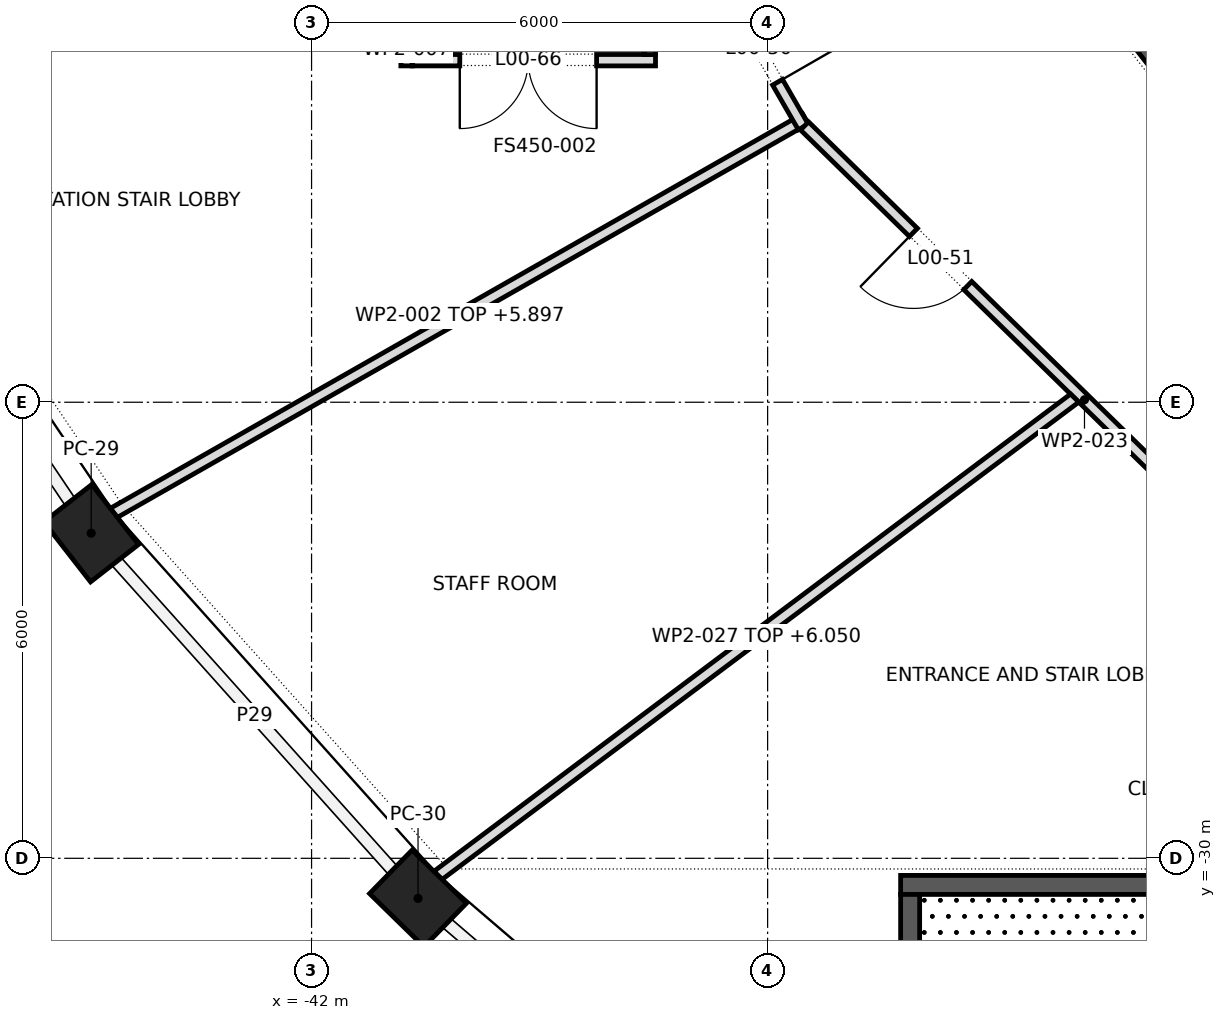
"""IFC4 building model, lengths in metres.
Left out: names, types, materials, properties, quantities, classifications, styles, units other than length and angle.
Written with IfcOpenShell. Run it as: python <this file> out.ifc"""

import sys

from ifc_helpers import new_model, si_unit, direction, frame, frame_2d, origin, origin_2d, place, context, subcontext, project, spatial, polyline, rectangle, outline, extrude, element, fill, save


model = new_model("IFC4")
c1 = context("Model", 3, precision=1e-05, world=origin(), true_north=direction((0.0, 1.0)))
c2 = subcontext(c1, "Body", "Model", "MODEL_VIEW")
j1 = project(units=[si_unit("LENGTHUNIT", "METRE"), si_unit("PLANEANGLEUNIT", "RADIAN")], contexts=[c1])
p1 = place(None, origin())
s1 = spatial("IfcSite", under=j1, at=p1, CompositionType="ELEMENT")
p2 = place(p1, origin())
s2 = spatial("IfcBuilding", under=s1, at=p2, CompositionType="ELEMENT")
p3 = place(p2, origin())
s3 = spatial("IfcBuildingStorey", under=s2, at=p3, CompositionType="ELEMENT", Elevation=0.0)
for number, where, z_axis, x_axis in (
    (1, (-44.899, -25.723, 0.0), (0.0, 0.0, 1.0), (0.615, -0.789, 0.0)),
    (2, (-40.599, -30.528, 0.0), (0.0, 0.0, 1.0), (0.715, -0.699, 0.0)),
):
    element("IfcColumn", number, at=place(p3, frame(where, z_axis=z_axis, x_axis=x_axis)), inside=s3, PredefinedType="COLUMN", context=c2, shape_type="SweptSolid", body=[
        extrude(rectangle(XDim=1.0, YDim=0.8, at=origin_2d()), origin(), (0.0, 0.0, 1.0), 7.0),
    ])
p4 = place(p3, frame((-34.097, -14.605, 0.0), z_axis=(0.0, 0.0, 1.0), x_axis=(0.614825322247, -0.788663314174, 0.0)))
e3 = element("IfcWall", 3, at=p4, inside=s3, PredefinedType="SHEAR", context=c2, shape_type="SweptSolid", body=[
    extrude(rectangle(XDim=8.632, YDim=1.2, at=frame_2d((4.316, 0.0))), origin(), (0.0, 0.0, 1.0), 7.0),
])
p5 = place(p3, frame((-34.25, -30.35, 0.0), z_axis=(0.0, 0.0, 1.0), x_axis=(1.0, 0.0, 0.0)))
e4 = element("IfcWall", 4, at=p5, inside=s3, PredefinedType="SHEAR", context=c2, shape_type="SweptSolid", body=[
    extrude(rectangle(XDim=8.5, YDim=0.25, at=frame_2d((4.25, 0.0))), origin(), (0.0, 0.0, 1.0), 6.65),
])
p6 = place(p3, frame((-34.125, -33.525, 0.0), z_axis=(0.0, 0.0, 1.0), x_axis=(0.0, 1.0, 0.0)))
e5 = element("IfcWall", 5, at=p6, inside=s3, PredefinedType="SHEAR", context=c2, shape_type="SweptSolid", body=[
    extrude(rectangle(XDim=3.05, YDim=0.25, at=frame_2d((1.525, 0.0))), origin(), (0.0, 0.0, 1.0), 6.65),
])
p7 = place(p3, frame((-44.602, -25.456, 0.0), z_axis=(0.0, 0.0, 1.0), x_axis=(0.868872232998, 0.495036405455, 0.0)))
e6 = element("IfcWall", 6, at=p7, inside=s3, PredefinedType="PARTITIONING", context=c2, shape_type="SweptSolid", body=[
    extrude(outline(polyline([(0.011, -0.075), (10.473, -0.075), (10.473, 0.075), (-0.011, 0.075), (0.011, -0.075)])), origin(), (0.0, 0.0, 1.0), 5.897),
])
p8 = place(p3, frame((-40.75, -19.575, 0.0), z_axis=(0.0, 0.0, 1.0), x_axis=(0.0, 1.0, 0.0)))
e7 = element("IfcWall", 7, at=p8, inside=s3, PredefinedType="PARTITIONING", context=c2, shape_type="SweptSolid", body=[
    extrude(rectangle(XDim=0.425, YDim=0.15, at=frame_2d((0.212, 0.0))), origin(), (0.0, 0.0, 1.0), 6.65),
])
p9 = place(p3, frame((-37.475, -19.5, 0.0), z_axis=(0.0, 0.0, 1.0), x_axis=(-1.0, 0.0, 0.0)))
e8 = element("IfcWall", 8, at=p9, inside=s3, PredefinedType="PARTITIONING", context=c2, shape_type="SweptSolid", body=[
    extrude(rectangle(XDim=3.2, YDim=0.15, at=frame_2d((1.6, 0.0))), origin(), (0.0, 0.0, 1.0), 6.65),
])
p10 = place(p9, frame((0.775, 0.0, 0.0)))
e9 = element("IfcOpeningElement", 9, at=p10, cuts=e8, PredefinedType="OPENING", context=c2, shape_type="SweptSolid", body=[
    extrude(rectangle(XDim=1.8, YDim=2.1, at=frame_2d((0.9, 1.05))), frame((0.0, 0.087, 0.0), z_axis=(0.0, -1.0, 0.0), x_axis=(1.0, 0.0, 0.0)), (0.0, 0.0, 1.0), 0.174),
])
p11 = place(p3, frame((-37.55, -19.426, 0.0), z_axis=(0.0, 0.0, 1.0), x_axis=(0.0, 1.0, 0.0)))
e10 = element("IfcWall", 10, at=p11, inside=s3, PredefinedType="PARTITIONING", context=c2, shape_type="SweptSolid", body=[
    extrude(rectangle(XDim=4.351, YDim=0.15, at=frame_2d((2.176, 0.0))), origin(), (0.0, 0.0, 1.0), 6.65),
])
p12 = place(p3, frame((-35.531, -20.378, 0.0), z_axis=(0.0, 0.0, 1.0), x_axis=(-0.498840465352, 0.866693827212, 0.0)))
e11 = element("IfcWall", 11, at=p12, inside=s3, PredefinedType="PARTITIONING", context=c2, shape_type="SweptSolid", body=[
    extrude(rectangle(XDim=3.899, YDim=0.15, at=frame_2d((1.95, 0.0))), origin(), (0.0, 0.0, 1.0), 6.65),
])
p13 = place(p12, frame((0.679, 0.0, 0.0)))
e12 = element("IfcOpeningElement", 12, at=p13, cuts=e11, PredefinedType="OPENING", context=c2, shape_type="SweptSolid", body=[
    extrude(rectangle(XDim=1.0, YDim=2.1, at=frame_2d((0.5, 1.05))), frame((0.0, 0.087, 0.0), z_axis=(0.0, -1.0, 0.0), x_axis=(1.0, 0.0, 0.0)), (0.0, 0.0, 1.0), 0.174),
])
p14 = place(p3, frame((-35.514, -20.365, 0.0), z_axis=(0.0, 0.0, 1.0), x_axis=(0.714835312925, -0.699292839514, 0.0)))
e13 = element("IfcWall", 13, at=p14, inside=s3, PredefinedType="PARTITIONING", context=c2, shape_type="SweptSolid", body=[
    extrude(rectangle(XDim=10.304, YDim=0.15, at=frame_2d((5.152, 0.0))), origin(), (0.0, 0.0, 1.0), 6.65),
])
p15 = place(p14, frame((2.004, 0.0, 0.0)))
e14 = element("IfcOpeningElement", 14, at=p15, cuts=e13, PredefinedType="OPENING", context=c2, shape_type="SweptSolid", body=[
    extrude(rectangle(XDim=1.0, YDim=2.1, at=frame_2d((0.5, 1.05))), frame((0.0, 0.087, 0.0), z_axis=(0.0, -1.0, 0.0), x_axis=(1.0, 0.0, 0.0)), (0.0, 0.0, 1.0), 0.174),
])
p16 = place(p3, frame((-31.96, -23.945, 0.0), z_axis=(0.0, 0.0, 1.0), x_axis=(-0.800117504973, -0.599843294732, 0.0)))
e15 = element("IfcWall", 15, at=p16, inside=s3, PredefinedType="PARTITIONING", context=c2, shape_type="SweptSolid", body=[
    extrude(outline(polyline([(0.011, -0.075), (10.482, -0.075), (10.459, 0.075), (-0.011, 0.075), (0.011, -0.075)])), origin(), (0.0, 0.0, 1.0), 6.05),
])
p17 = place(p13, frame((1.0, 0.0, 0.0), z_axis=(0.0, 0.0, 1.0), x_axis=(-1.0, 0.0, 0.0)))
e16 = element("IfcDoor", 16, at=p17, inside=s3, OperationType="SINGLE_SWING_LEFT", PredefinedType="DOOR", context=c2, shape_type="SweptSolid", body=[
    extrude(rectangle(XDim=1.0, YDim=2.1, at=frame_2d((0.5, 1.05))), frame((0.0, 0.025, 0.0), z_axis=(0.0, -1.0, 0.0), x_axis=(1.0, 0.0, 0.0)), (0.0, 0.0, 1.0), 0.05),
])
fill(e12, e16)
p18 = place(p15, frame((1.0, 0.0, 0.0), z_axis=(0.0, 0.0, 1.0), x_axis=(-1.0, 0.0, 0.0)))
e17 = element("IfcDoor", 17, at=p18, inside=s3, OperationType="SINGLE_SWING_LEFT", PredefinedType="DOOR", context=c2, shape_type="SweptSolid", body=[
    extrude(rectangle(XDim=1.0, YDim=2.1, at=frame_2d((0.5, 1.05))), frame((0.0, 0.025, 0.0), z_axis=(0.0, -1.0, 0.0), x_axis=(1.0, 0.0, 0.0)), (0.0, 0.0, 1.0), 0.05),
])
fill(e14, e17)
p19 = place(p10, origin())
e18 = element("IfcDoor", 18, at=p19, inside=s3, OperationType="DOUBLE_DOOR_SINGLE_SWING", PredefinedType="DOOR", context=c2, shape_type="SweptSolid", body=[
    extrude(rectangle(XDim=1.8, YDim=2.1, at=frame_2d((0.9, 1.05))), frame((0.0, 0.025, 0.0), z_axis=(0.0, -1.0, 0.0), x_axis=(1.0, 0.0, 0.0)), (0.0, 0.0, 1.0), 0.05),
])
fill(e9, e18)
save(model, sys.argv[1])
